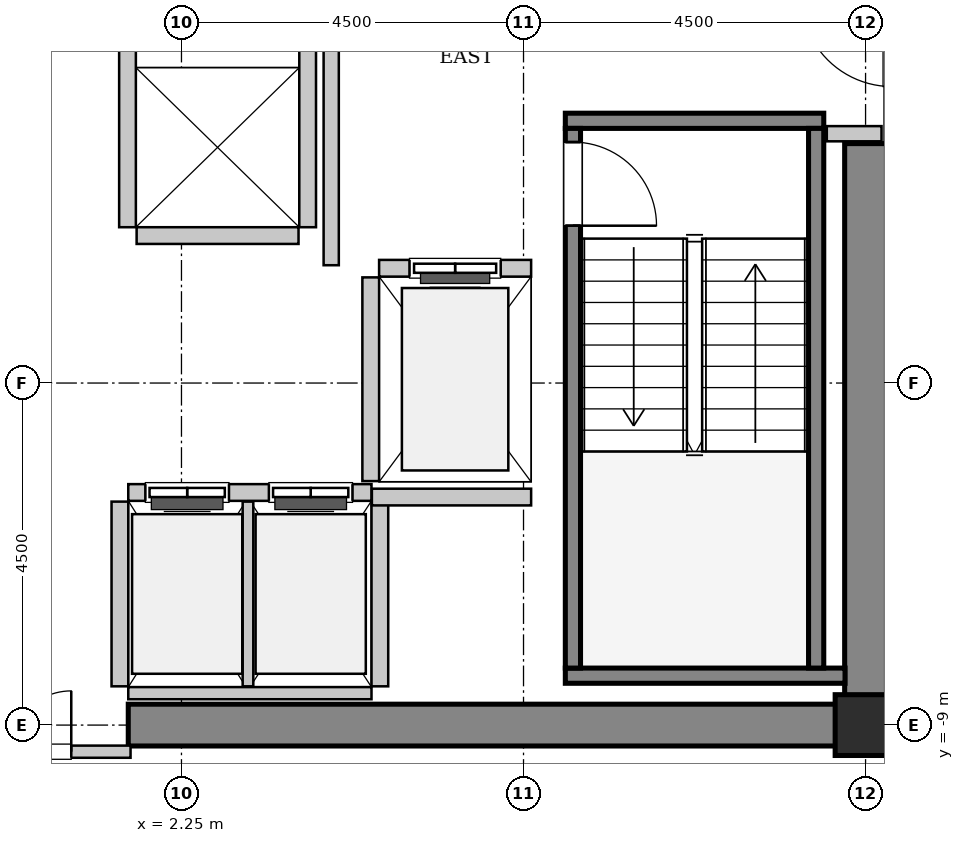
"""IFC4 building model, lengths in metres.
Left out: names, types, materials, properties, quantities, classifications, styles, units other than length and angle.
Written with IfcOpenShell. Run it as: python <this file> out.ifc"""

import sys

from ifc_helpers import new_model, si_unit, direction, frame, frame_2d, origin, origin_2d, place, context, subcontext, project, spatial, rectangle, hollow_rectangle, extrude, source, transform, mapped, element, fill, save


model = new_model("IFC4")
c1 = context("Model", 3, precision=1e-05, world=origin(), true_north=direction((0.0, 1.0)))
c2 = subcontext(c1, "Body", "Model", "MODEL_VIEW")
j1 = project(units=[si_unit("LENGTHUNIT", "METRE"), si_unit("PLANEANGLEUNIT", "RADIAN")], contexts=[c1])
p1 = place(None, origin())
s1 = spatial("IfcSite", under=j1, at=p1, CompositionType="ELEMENT")
p2 = place(p1, origin())
s2 = spatial("IfcBuilding", under=s1, at=p2, CompositionType="ELEMENT")
p3 = place(p2, frame((0.0, 0.0, 198.2)))
s3 = spatial("IfcBuildingStorey", under=s2, at=p3, CompositionType="ELEMENT", Elevation=198.2)
m1 = source(origin(), c2, "Body", "SweptSolid", [
    extrude(rectangle(XDim=9.975, YDim=0.55, at=frame_2d((4.987, 0.0))), origin(), (0.0, 0.0, 1.0), 3.8),
])
p4 = place(p3, frame((1.55, -9.0, 0.0), z_axis=(0.0, 0.0, 1.0), x_axis=(1.0, 0.0, 0.0)))
e1 = element("IfcWall", 1, at=p4, inside=s3, PredefinedType="SHEAR", context=c2, shape_type="MappedRepresentation", body=[
    mapped(m1, transform((0.0, 0.0, 0.0), x_axis=(1.0, 0.0, 0.0), y_axis=(0.0, 1.0, 0.0), z_axis=(0.0, 0.0, 1.0), scale=1.0)),
])
m2 = source(origin(), c2, "Body", "SweptSolid", [
    extrude(rectangle(XDim=7.375, YDim=0.55, at=frame_2d((3.688, 0.0))), origin(), (0.0, 0.0, 1.0), 3.8),
])
p5 = place(p3, frame((11.25, -8.725, 0.0), z_axis=(0.0, 0.0, 1.0), x_axis=(0.0, 1.0, 0.0)))
e2 = element("IfcWall", 2, at=p5, inside=s3, PredefinedType="SHEAR", context=c2, shape_type="MappedRepresentation", body=[
    mapped(m2, transform((0.0, 0.0, 0.0), x_axis=(1.0, 0.0, 0.0), y_axis=(0.0, 1.0, 0.0), z_axis=(0.0, 0.0, 1.0), scale=1.0)),
])
m3 = source(origin(), c2, "Body", "SweptSolid", [
    extrude(hollow_rectangle(XDim=0.8, YDim=0.8, WallThickness=0.04, InnerFilletRadius=0.04, OuterFilletRadius=0.08, at=origin_2d()), origin(), (0.0, 0.0, 1.0), 3.8),
])
p6 = place(p3, frame((11.25, -9.0, 0.0), z_axis=(0.0, 0.0, 1.0), x_axis=(1.0, 0.0, 0.0)))
e3 = element("IfcColumn", 3, at=p6, inside=s3, PredefinedType="COLUMN", context=c2, shape_type="MappedRepresentation", body=[
    mapped(m3, transform((0.0, 0.0, 0.0), x_axis=(1.0, 0.0, 0.0), y_axis=(0.0, 1.0, 0.0), z_axis=(0.0, 0.0, 1.0), scale=1.0)),
])
m4 = source(origin(), c2, "Body", "SweptSolid", [
    extrude(rectangle(XDim=3.4, YDim=0.2, at=frame_2d((1.7, 0.0))), origin(), (0.0, 0.0, 1.0), 3.8),
])
p7 = place(p3, frame((7.3, -1.05, 0.0), z_axis=(0.0, 0.0, 1.0), x_axis=(1.0, 0.0, 0.0)))
e4 = element("IfcWall", 4, at=p7, inside=s3, PredefinedType="SOLIDWALL", context=c2, shape_type="MappedRepresentation", body=[
    mapped(m4, transform((0.0, 0.0, 0.0), x_axis=(1.0, 0.0, 0.0), y_axis=(0.0, 1.0, 0.0), z_axis=(0.0, 0.0, 1.0), scale=1.0)),
])
m5 = source(origin(), c2, "Body", "SweptSolid", [
    extrude(rectangle(XDim=3.68, YDim=0.2, at=frame_2d((1.84, 0.0))), origin(), (0.0, 0.0, 1.0), 3.8),
])
p8 = place(p3, frame((7.3, -8.35, 0.0), z_axis=(0.0, 0.0, 1.0), x_axis=(1.0, 0.0, 0.0)))
e5 = element("IfcWall", 5, at=p8, inside=s3, PredefinedType="SOLIDWALL", context=c2, shape_type="MappedRepresentation", body=[
    mapped(m5, transform((0.0, 0.0, 0.0), x_axis=(1.0, 0.0, 0.0), y_axis=(0.0, 1.0, 0.0), z_axis=(0.0, 0.0, 1.0), scale=1.0)),
])
m6 = source(origin(), c2, "Body", "SweptSolid", [
    extrude(rectangle(XDim=7.1, YDim=0.2, at=frame_2d((3.55, 0.0))), origin(), (0.0, 0.0, 1.0), 3.8),
])
p9 = place(p3, frame((7.4, -1.15, 0.0), z_axis=(0.0, 0.0, 1.0), x_axis=(0.0, -1.0, 0.0)))
e6 = element("IfcWall", 6, at=p9, inside=s3, PredefinedType="SOLIDWALL", context=c2, shape_type="MappedRepresentation", body=[
    mapped(m6, transform((0.0, 0.0, 0.0), x_axis=(1.0, 0.0, 0.0), y_axis=(0.0, 1.0, 0.0), z_axis=(0.0, 0.0, 1.0), scale=1.0)),
])
p10 = place(p9, frame((0.18, 0.0, 0.0)))
e7 = element("IfcOpeningElement", 7, at=p10, cuts=e6, PredefinedType="OPENING", context=c2, shape_type="SweptSolid", body=[
    extrude(rectangle(XDim=1.1, YDim=2.15, at=frame_2d((0.55, 1.075))), frame((0.0, 0.11, 0.0), z_axis=(0.0, -1.0, 0.0), x_axis=(1.0, 0.0, 0.0)), (0.0, 0.0, 1.0), 0.22),
])
p11 = place(p3, frame((10.6, -1.15, 0.0), z_axis=(0.0, 0.0, 1.0), x_axis=(0.0, -1.0, 0.0)))
e8 = element("IfcWall", 8, at=p11, inside=s3, PredefinedType="SOLIDWALL", context=c2, shape_type="MappedRepresentation", body=[
    mapped(m6, transform((0.0, 0.0, 0.0), x_axis=(1.0, 0.0, 0.0), y_axis=(0.0, 1.0, 0.0), z_axis=(0.0, 0.0, 1.0), scale=1.0)),
])
m7 = source(origin(), c2, "Body", "SweptSolid", [
    extrude(rectangle(XDim=2.0, YDim=0.22, at=frame_2d((1.0, 0.0))), origin(), (0.0, 0.0, 1.0), 3.485),
])
p12 = place(p3, frame((6.85, -2.99, 0.0), z_axis=(0.0, 0.0, 1.0), x_axis=(-1.0, 0.0, 0.0)))
e9 = element("IfcWall", 9, at=p12, inside=s3, PredefinedType="SOLIDWALL", context=c2, shape_type="MappedRepresentation", body=[
    mapped(m7, transform((0.0, 0.0, 0.0), x_axis=(1.0, 0.0, 0.0), y_axis=(0.0, 1.0, 0.0), z_axis=(0.0, 0.0, 1.0), scale=1.0)),
])
p13 = place(p12, frame((0.4, 0.0, 0.0)))
e10 = element("IfcOpeningElement", 10, at=p13, cuts=e9, PredefinedType="OPENING", context=c2, shape_type="SweptSolid", body=[
    extrude(rectangle(XDim=1.2, YDim=2.2, at=frame_2d((0.6, 1.1))), frame((0.0, 0.12, 0.0), z_axis=(0.0, -1.0, 0.0), x_axis=(1.0, 0.0, 0.0)), (0.0, 0.0, 1.0), 0.24),
])
m8 = source(origin(), c2, "Body", "SweptSolid", [
    extrude(rectangle(XDim=2.68, YDim=0.22, at=frame_2d((1.34, 0.0))), origin(), (0.0, 0.0, 1.0), 3.485),
])
p14 = place(p3, frame((4.74, -3.11, 0.0), z_axis=(0.0, 0.0, 1.0), x_axis=(0.0, -1.0, 0.0)))
e11 = element("IfcWall", 11, at=p14, inside=s3, PredefinedType="SOLIDWALL", context=c2, shape_type="MappedRepresentation", body=[
    mapped(m8, transform((0.0, 0.0, 0.0), x_axis=(1.0, 0.0, 0.0), y_axis=(0.0, 1.0, 0.0), z_axis=(0.0, 0.0, 1.0), scale=1.0)),
])
m9 = source(origin(), c2, "Body", "SweptSolid", [
    extrude(rectangle(XDim=3.2, YDim=0.22, at=frame_2d((1.6, 0.0))), origin(), (0.0, 0.0, 1.0), 3.485),
])
p15 = place(p3, frame((4.75, -5.94, 0.0), z_axis=(0.0, 0.0, 1.0), x_axis=(-1.0, 0.0, 0.0)))
e12 = element("IfcWall", 12, at=p15, inside=s3, PredefinedType="SOLIDWALL", context=c2, shape_type="MappedRepresentation", body=[
    mapped(m9, transform((0.0, 0.0, 0.0), x_axis=(1.0, 0.0, 0.0), y_axis=(0.0, 1.0, 0.0), z_axis=(0.0, 0.0, 1.0), scale=1.0)),
])
p16 = place(p15, frame((1.875, 0.0, 0.0)))
e13 = element("IfcOpeningElement", 13, at=p16, cuts=e12, PredefinedType="OPENING", context=c2, shape_type="SweptSolid", body=[
    extrude(rectangle(XDim=1.1, YDim=2.2, at=frame_2d((0.55, 1.1))), frame((0.0, 0.12, 0.0), z_axis=(0.0, -1.0, 0.0), x_axis=(1.0, 0.0, 0.0)), (0.0, 0.0, 1.0), 0.24),
])
p17 = place(p15, frame((0.25, 0.0, 0.0)))
e14 = element("IfcOpeningElement", 14, at=p17, cuts=e12, PredefinedType="OPENING", context=c2, shape_type="SweptSolid", body=[
    extrude(rectangle(XDim=1.1, YDim=2.2, at=frame_2d((0.55, 1.1))), frame((0.0, 0.12, 0.0), z_axis=(0.0, -1.0, 0.0), x_axis=(1.0, 0.0, 0.0)), (0.0, 0.0, 1.0), 0.24),
])
m10 = source(origin(), c2, "Body", "SweptSolid", [
    extrude(rectangle(XDim=3.2, YDim=0.16, at=frame_2d((1.6, 0.0))), origin(), (0.0, 0.0, 1.0), 2.375),
])
p18 = place(p3, frame((1.55, -8.58, 0.0), z_axis=(0.0, 0.0, 1.0), x_axis=(1.0, 0.0, 0.0)))
e15 = element("IfcWall", 15, at=p18, inside=s3, PredefinedType="PARTITIONING", context=c2, shape_type="MappedRepresentation", body=[
    mapped(m10, transform((0.0, 0.0, 0.0), x_axis=(1.0, 0.0, 0.0), y_axis=(0.0, 1.0, 0.0), z_axis=(0.0, 0.0, 1.0), scale=1.0)),
])
m11 = source(origin(), c2, "Body", "SweptSolid", [
    extrude(rectangle(XDim=2.43, YDim=0.22, at=frame_2d((1.215, 0.0))), origin(), (0.0, 0.0, 1.0), 3.485),
])
p19 = place(p3, frame((1.44, -6.06, 0.0), z_axis=(0.0, 0.0, 1.0), x_axis=(0.0, -1.0, 0.0)))
e16 = element("IfcWall", 16, at=p19, inside=s3, PredefinedType="SOLIDWALL", context=c2, shape_type="MappedRepresentation", body=[
    mapped(m11, transform((0.0, 0.0, 0.0), x_axis=(1.0, 0.0, 0.0), y_axis=(0.0, 1.0, 0.0), z_axis=(0.0, 0.0, 1.0), scale=1.0)),
])
m12 = source(origin(), c2, "Body", "SweptSolid", [
    extrude(rectangle(XDim=2.43, YDim=0.14, at=frame_2d((1.215, 0.0))), origin(), (0.0, 0.0, 1.0), 3.485),
])
p20 = place(p3, frame((3.125, -8.49, 0.0), z_axis=(0.0, 0.0, 1.0), x_axis=(0.0, 1.0, 0.0)))
e17 = element("IfcWall", 17, at=p20, inside=s3, PredefinedType="PARTITIONING", context=c2, shape_type="MappedRepresentation", body=[
    mapped(m12, transform((0.0, 0.0, 0.0), x_axis=(1.0, 0.0, 0.0), y_axis=(0.0, 1.0, 0.0), z_axis=(0.0, 0.0, 1.0), scale=1.0)),
])
p21 = place(p3, frame((4.86, -8.49, 0.0), z_axis=(0.0, 0.0, 1.0), x_axis=(0.0, 1.0, 0.0)))
e18 = element("IfcWall", 18, at=p21, inside=s3, PredefinedType="SOLIDWALL", context=c2, shape_type="MappedRepresentation", body=[
    mapped(m11, transform((0.0, 0.0, 0.0), x_axis=(1.0, 0.0, 0.0), y_axis=(0.0, 1.0, 0.0), z_axis=(0.0, 0.0, 1.0), scale=1.0)),
])
m13 = source(origin(), c2, "Body", "SweptSolid", [
    extrude(rectangle(XDim=4.9, YDim=0.22, at=frame_2d((2.45, 0.0))), origin(), (0.0, 0.0, 1.0), 3.485),
])
for number, where, z_axis, x_axis in (
    (19, (1.54, 2.45, 0.0), (0.0, 0.0, 1.0), (0.0, -1.0, 0.0)),
    (20, (3.91, -2.45, 0.0), (0.0, 0.0, 1.0), (0.0, 1.0, 0.0)),
):
    element("IfcWall", number, at=place(p3, frame(where, z_axis=z_axis, x_axis=x_axis)), inside=s3, PredefinedType="SOLIDWALL", context=c2, shape_type="MappedRepresentation", body=[
        mapped(m13, transform((0.0, 0.0, 0.0), x_axis=(1.0, 0.0, 0.0), y_axis=(0.0, 1.0, 0.0), z_axis=(0.0, 0.0, 1.0), scale=1.0)),
    ])
m14 = source(origin(), c2, "Body", "SweptSolid", [
    extrude(rectangle(XDim=2.13, YDim=0.22, at=frame_2d((1.065, 0.0))), origin(), (0.0, 0.0, 1.0), 3.485),
])
p22 = place(p3, frame((1.66, -2.56, 0.0), z_axis=(0.0, 0.0, 1.0), x_axis=(1.0, 0.0, 0.0)))
e21 = element("IfcWall", 21, at=p22, inside=s3, PredefinedType="SOLIDWALL", context=c2, shape_type="MappedRepresentation", body=[
    mapped(m14, transform((0.0, 0.0, 0.0), x_axis=(1.0, 0.0, 0.0), y_axis=(0.0, 1.0, 0.0), z_axis=(0.0, 0.0, 1.0), scale=1.0)),
])
m15 = source(origin(), c2, "Body", "SweptSolid", [
    extrude(rectangle(XDim=2.095, YDim=0.22, at=frame_2d((1.048, 0.0))), origin(), (0.0, 0.0, 1.0), 3.485),
])
p23 = place(p3, frame((4.755, -6.0, 0.0), z_axis=(0.0, 0.0, 1.0), x_axis=(1.0, 0.0, 0.0)))
e22 = element("IfcWall", 22, at=p23, inside=s3, PredefinedType="SOLIDWALL", context=c2, shape_type="MappedRepresentation", body=[
    mapped(m15, transform((0.0, 0.0, 0.0), x_axis=(1.0, 0.0, 0.0), y_axis=(0.0, 1.0, 0.0), z_axis=(0.0, 0.0, 1.0), scale=1.0)),
])
m16 = source(origin(), c2, "Body", "SweptSolid", [
    extrude(rectangle(XDim=5.9, YDim=0.2, at=frame_2d((2.95, 0.0))), origin(), (0.0, 0.0, 1.0), 3.485),
])
p24 = place(p3, frame((4.22, -2.95, 0.0), z_axis=(0.0, 0.0, 1.0), x_axis=(0.0, 1.0, 0.0)))
e23 = element("IfcWall", 23, at=p24, inside=s3, PredefinedType="PARTITIONING", context=c2, shape_type="MappedRepresentation", body=[
    mapped(m16, transform((0.0, 0.0, 0.0), x_axis=(1.0, 0.0, 0.0), y_axis=(0.0, 1.0, 0.0), z_axis=(0.0, 0.0, 1.0), scale=1.0)),
])
m17 = source(origin(), c2, "Body", "SweptSolid", [
    extrude(rectangle(XDim=0.72, YDim=0.2, at=frame_2d((0.36, 0.0))), origin(), (0.0, 0.0, 1.0), 3.485),
])
p25 = place(p3, frame((10.74, -1.22, 0.0), z_axis=(0.0, 0.0, 1.0), x_axis=(1.0, 0.0, 0.0)))
e24 = element("IfcWall", 24, at=p25, inside=s3, PredefinedType="PARTITIONING", context=c2, shape_type="MappedRepresentation", body=[
    mapped(m17, transform((0.0, 0.0, 0.0), x_axis=(1.0, 0.0, 0.0), y_axis=(0.0, 1.0, 0.0), z_axis=(0.0, 0.0, 1.0), scale=1.0)),
])
m18 = source(origin(), c2, "Body", "SweptSolid", [
    extrude(rectangle(XDim=3.16, YDim=0.16, at=frame_2d((1.58, 0.0))), origin(), (0.0, 0.0, 1.0), 2.375),
])
p26 = place(p3, frame((-1.58, -9.35, 0.0), z_axis=(0.0, 0.0, 1.0), x_axis=(1.0, 0.0, 0.0)))
e25 = element("IfcWall", 25, at=p26, inside=s3, PredefinedType="PARTITIONING", context=c2, shape_type="MappedRepresentation", body=[
    mapped(m18, transform((0.0, 0.0, 0.0), x_axis=(1.0, 0.0, 0.0), y_axis=(0.0, 1.0, 0.0), z_axis=(0.0, 0.0, 1.0), scale=1.0)),
])
p27 = place(p26, frame((0.78, 0.0, 0.0)))
e26 = element("IfcOpeningElement", 26, at=p27, cuts=e25, PredefinedType="OPENING", context=c2, shape_type="SweptSolid", body=[
    extrude(rectangle(XDim=1.6, YDim=2.3, at=frame_2d((0.8, 1.15))), frame((0.0, 0.09, 0.0), z_axis=(0.0, -1.0, 0.0), x_axis=(1.0, 0.0, 0.0)), (0.0, 0.0, 1.0), 0.18),
])
m19 = source(origin(), c2, "Body", "SweptSolid", [
    extrude(rectangle(XDim=1.1, YDim=2.15, at=frame_2d((0.55, 1.075))), frame((0.0, 0.025, 0.0), z_axis=(0.0, -1.0, 0.0), x_axis=(1.0, 0.0, 0.0)), (0.0, 0.0, 1.0), 0.05),
])
p28 = place(p10, origin())
e27 = element("IfcDoor", 27, at=p28, inside=s3, OperationType="SINGLE_SWING_RIGHT", PredefinedType="DOOR", context=c2, shape_type="MappedRepresentation", body=[
    mapped(m19, transform((0.0, 0.0, 0.0), x_axis=(1.0, 0.0, 0.0), y_axis=(0.0, 1.0, 0.0), z_axis=(0.0, 0.0, 1.0), scale=1.0)),
])
fill(e7, e27)
m20 = source(origin(), c2, "Body", "SweptSolid", [
    extrude(rectangle(XDim=1.2, YDim=2.2, at=frame_2d((0.6, 1.1))), frame((0.0, 0.025, 0.0), z_axis=(0.0, -1.0, 0.0), x_axis=(1.0, 0.0, 0.0)), (0.0, 0.0, 1.0), 0.05),
])
p29 = place(p13, origin())
e28 = element("IfcDoor", 28, at=p29, inside=s3, OperationType="SLIDING_TO_LEFT", PredefinedType="DOOR", context=c2, shape_type="MappedRepresentation", body=[
    mapped(m20, transform((0.0, 0.0, 0.0), x_axis=(1.0, 0.0, 0.0), y_axis=(0.0, 1.0, 0.0), z_axis=(0.0, 0.0, 1.0), scale=1.0)),
])
fill(e10, e28)
m21 = source(origin(), c2, "Body", "SweptSolid", [
    extrude(rectangle(XDim=1.1, YDim=2.2, at=frame_2d((0.55, 1.1))), frame((0.0, 0.025, 0.0), z_axis=(0.0, -1.0, 0.0), x_axis=(1.0, 0.0, 0.0)), (0.0, 0.0, 1.0), 0.05),
])
p30 = place(p16, origin())
e29 = element("IfcDoor", 29, at=p30, inside=s3, OperationType="DOUBLE_DOOR_SLIDING", PredefinedType="DOOR", context=c2, shape_type="MappedRepresentation", body=[
    mapped(m21, transform((0.0, 0.0, 0.0), x_axis=(1.0, 0.0, 0.0), y_axis=(0.0, 1.0, 0.0), z_axis=(0.0, 0.0, 1.0), scale=1.0)),
])
fill(e13, e29)
p31 = place(p17, origin())
e30 = element("IfcDoor", 30, at=p31, inside=s3, OperationType="DOUBLE_DOOR_SLIDING", PredefinedType="DOOR", context=c2, shape_type="MappedRepresentation", body=[
    mapped(m21, transform((0.0, 0.0, 0.0), x_axis=(1.0, 0.0, 0.0), y_axis=(0.0, 1.0, 0.0), z_axis=(0.0, 0.0, 1.0), scale=1.0)),
])
fill(e14, e30)
m22 = source(origin(), c2, "Body", "SweptSolid", [
    extrude(rectangle(XDim=1.6, YDim=2.3, at=frame_2d((0.8, 1.15))), frame((0.0, 0.025, 0.0), z_axis=(0.0, -1.0, 0.0), x_axis=(1.0, 0.0, 0.0)), (0.0, 0.0, 1.0), 0.05),
])
p32 = place(p27, origin())
e31 = element("IfcDoor", 31, at=p32, inside=s3, OperationType="DOUBLE_DOOR_SINGLE_SWING", PredefinedType="DOOR", context=c2, shape_type="MappedRepresentation", body=[
    mapped(m22, transform((0.0, 0.0, 0.0), x_axis=(1.0, 0.0, 0.0), y_axis=(0.0, 1.0, 0.0), z_axis=(0.0, 0.0, 1.0), scale=1.0)),
])
fill(e26, e31)
save(model, sys.argv[1])
